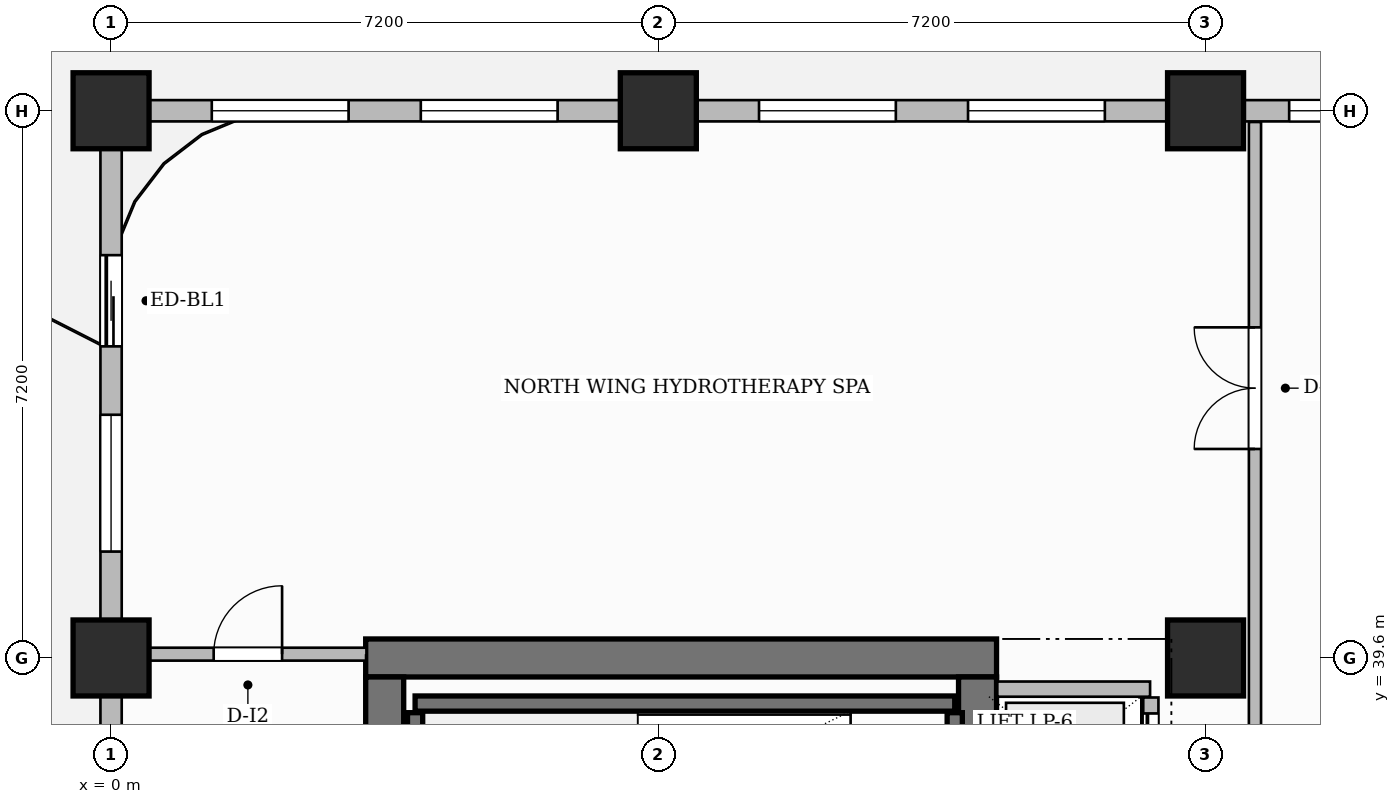
"""IFC4 building model, lengths in metres.
Left out: names, types, materials, properties, quantities, classifications, styles, units other than length and angle.
Written with IfcOpenShell. Run it as: python <this file> out.ifc"""

import sys

from ifc_helpers import new_model, si_unit, direction, frame, frame_2d, origin, origin_2d, place, context, subcontext, project, spatial, rectangle, extrude, source, transform, mapped, element, fill, save


model = new_model("IFC4")
c1 = context("Model", 3, precision=1e-05, world=origin(), true_north=direction((0.0, 1.0)))
c2 = subcontext(c1, "Body", "Model", "MODEL_VIEW")
j1 = project(units=[si_unit("LENGTHUNIT", "METRE"), si_unit("PLANEANGLEUNIT", "RADIAN")], contexts=[c1])
p1 = place(None, origin())
s1 = spatial("IfcSite", under=j1, at=p1, CompositionType="ELEMENT")
p2 = place(p1, origin())
s2 = spatial("IfcBuilding", under=s1, at=p2, CompositionType="ELEMENT")
p3 = place(p2, frame((0.0, 0.0, 181.1)))
s3 = spatial("IfcBuildingStorey", under=s2, at=p3, CompositionType="ELEMENT", Elevation=181.1)
p4 = place(p3, frame((3.35, 39.6, 0.0), z_axis=(0.0, 0.0, 1.0), x_axis=(1.0, 0.0, 0.0)))
e1 = element("IfcWall", 1, at=p4, inside=s3, PredefinedType="SHEAR", context=c2, shape_type="SweptSolid", body=[
    extrude(rectangle(XDim=8.3, YDim=0.5, at=frame_2d((4.15, 0.0))), origin(), (0.0, 0.0, 1.0), 3.85),
])
p5 = place(p3, frame((3.6, 25.45, 0.0), z_axis=(0.0, 0.0, 1.0), x_axis=(0.0, 1.0, 0.0)))
e2 = element("IfcWall", 2, at=p5, inside=s3, PredefinedType="SHEAR", context=c2, shape_type="SweptSolid", body=[
    extrude(rectangle(XDim=13.9, YDim=0.5, at=frame_2d((6.95, 0.0))), origin(), (0.0, 0.0, 1.0), 3.85),
])
p6 = place(p3, frame((11.4, 25.45, 0.0), z_axis=(0.0, 0.0, 1.0), x_axis=(0.0, 1.0, 0.0)))
e3 = element("IfcWall", 3, at=p6, inside=s3, PredefinedType="SHEAR", context=c2, shape_type="SweptSolid", body=[
    extrude(rectangle(XDim=13.9, YDim=0.5, at=frame_2d((6.95, 0.0))), origin(), (0.0, 0.0, 1.0), 3.85),
])
p7 = place(p6, frame((6.52, 0.0, 0.0)))
e4 = element("IfcOpeningElement", 4, at=p7, cuts=e3, PredefinedType="OPENING", context=c2, shape_type="SweptSolid", body=[
    extrude(rectangle(XDim=1.5, YDim=2.2, at=frame_2d((0.75, 1.1))), frame((0.0, 0.26, 0.0), z_axis=(0.0, -1.0, 0.0), x_axis=(1.0, 0.0, 0.0)), (0.0, 0.0, 1.0), 0.52),
])
m1 = source(origin(), c2, "Body", "SweptSolid", [
    extrude(rectangle(XDim=1.0, YDim=1.0, at=origin_2d()), origin(), (0.0, 0.0, 1.0), 3.85),
])
for number, where, z_axis, x_axis in (
    (5, (0.0, 39.6, 0.0), (0.0, 0.0, 1.0), (1.0, 0.0, 0.0)),
    (6, (0.0, 46.8, 0.0), (0.0, 0.0, 1.0), (1.0, 0.0, 0.0)),
    (7, (7.2, 46.8, 0.0), (0.0, 0.0, 1.0), (1.0, 0.0, 0.0)),
    (8, (14.4, 39.6, 0.0), (0.0, 0.0, 1.0), (1.0, 0.0, 0.0)),
    (9, (14.4, 46.8, 0.0), (0.0, 0.0, 1.0), (1.0, 0.0, 0.0)),
):
    element("IfcColumn", number, at=place(p3, frame(where, z_axis=z_axis, x_axis=x_axis)), inside=s3, PredefinedType="COLUMN", context=c2, shape_type="MappedRepresentation", body=[
        mapped(m1, transform((0.0, 0.0, 0.0), scale=1.0)),
    ])
p8 = place(p3, frame((4.0, 39.0, 0.0), z_axis=(0.0, 0.0, 1.0), x_axis=(1.0, 0.0, 0.0)))
e10 = element("IfcWall", 10, at=p8, inside=s3, PredefinedType="SHEAR", context=c2, shape_type="SweptSolid", body=[
    extrude(rectangle(XDim=7.1, YDim=0.2, at=frame_2d((3.55, 0.0))), origin(), (0.0, 0.0, 1.0), 3.85),
])
for number, where, z_axis, x_axis in (
    (11, (4.0, 36.18, 0.0), (0.0, 0.0, 1.0), (0.0, 1.0, 0.0)),
    (12, (11.1, 36.18, 0.0), (0.0, 0.0, 1.0), (0.0, 1.0, 0.0)),
):
    element("IfcWall", number, at=place(p3, frame(where, z_axis=z_axis, x_axis=x_axis)), inside=s3, PredefinedType="SHEAR", context=c2, shape_type="SweptSolid", body=[
        extrude(rectangle(XDim=2.7, YDim=0.2, at=frame_2d((1.35, 0.0))), origin(), (0.0, 0.0, 1.0), 3.85),
    ])
p9 = place(p3, frame((11.66, 39.19, 0.0), z_axis=(0.0, 0.0, 1.0), x_axis=(1.0, 0.0, 0.0)))
e13 = element("IfcWall", 13, at=p9, inside=s3, PredefinedType="PARTITIONING", context=c2, shape_type="SweptSolid", body=[
    extrude(rectangle(XDim=2.01, YDim=0.2, at=frame_2d((1.005, 0.0))), origin(), (0.0, 0.0, 1.0), 3.6),
])
p10 = place(p3, frame((13.68, 34.36, 0.0), z_axis=(0.0, 0.0, 1.0), x_axis=(0.0, 1.0, 0.0)))
e14 = element("IfcWall", 14, at=p10, inside=s3, PredefinedType="PARTITIONING", context=c2, shape_type="SweptSolid", body=[
    extrude(rectangle(XDim=4.72, YDim=0.2, at=frame_2d((2.36, 0.0))), origin(), (0.0, 0.0, 1.0), 3.6),
])
p11 = place(p10, frame((0.21, 0.0, 0.0)))
e15 = element("IfcOpeningElement", 15, at=p11, cuts=e14, PredefinedType="OPENING", context=c2, shape_type="SweptSolid", body=[
    extrude(rectangle(XDim=1.1, YDim=2.2, at=frame_2d((0.55, 1.1))), frame((0.0, 0.11, 0.0), z_axis=(0.0, -1.0, 0.0), x_axis=(1.0, 0.0, 0.0)), (0.0, 0.0, 1.0), 0.22),
])
p12 = place(p10, frame((1.81, 0.0, 0.0)))
e16 = element("IfcOpeningElement", 16, at=p12, cuts=e14, PredefinedType="OPENING", context=c2, shape_type="SweptSolid", body=[
    extrude(rectangle(XDim=1.1, YDim=2.2, at=frame_2d((0.55, 1.1))), frame((0.0, 0.11, 0.0), z_axis=(0.0, -1.0, 0.0), x_axis=(1.0, 0.0, 0.0)), (0.0, 0.0, 1.0), 0.22),
])
p13 = place(p10, frame((3.41, 0.0, 0.0)))
e17 = element("IfcOpeningElement", 17, at=p13, cuts=e14, PredefinedType="OPENING", context=c2, shape_type="SweptSolid", body=[
    extrude(rectangle(XDim=1.1, YDim=2.2, at=frame_2d((0.55, 1.1))), frame((0.0, 0.11, 0.0), z_axis=(0.0, -1.0, 0.0), x_axis=(1.0, 0.0, 0.0)), (0.0, 0.0, 1.0), 0.22),
])
p14 = place(p3, frame((0.24, 39.65, 0.0), z_axis=(0.0, 0.0, 1.0), x_axis=(1.0, 0.0, 0.0)))
e18 = element("IfcWall", 18, at=p14, inside=s3, PredefinedType="PARTITIONING", context=c2, shape_type="SweptSolid", body=[
    extrude(rectangle(XDim=3.12, YDim=0.17, at=frame_2d((1.56, 0.0))), origin(), (0.0, 0.0, 1.0), 3.6),
])
p15 = place(p14, frame((1.11, 0.0, 0.0)))
e19 = element("IfcOpeningElement", 19, at=p15, cuts=e18, PredefinedType="OPENING", context=c2, shape_type="SweptSolid", body=[
    extrude(rectangle(XDim=0.9, YDim=2.15, at=frame_2d((0.45, 1.075))), frame((0.0, 0.095, 0.0), z_axis=(0.0, -1.0, 0.0), x_axis=(1.0, 0.0, 0.0)), (0.0, 0.0, 1.0), 0.19),
])
p16 = place(p3, frame((15.05, 34.34, 0.0), z_axis=(0.0, 0.0, 1.0), x_axis=(0.0, 1.0, 0.0)))
e20 = element("IfcWall", 20, at=p16, inside=s3, PredefinedType="PARTITIONING", context=c2, shape_type="SweptSolid", body=[
    extrude(rectangle(XDim=12.312, YDim=0.16, at=frame_2d((6.156, 0.0))), origin(), (0.0, 0.0, 1.0), 3.6),
])
p17 = place(p16, frame((8.01, 0.0, 0.0)))
e21 = element("IfcOpeningElement", 21, at=p17, cuts=e20, PredefinedType="OPENING", context=c2, shape_type="SweptSolid", body=[
    extrude(rectangle(XDim=1.6, YDim=2.4, at=frame_2d((0.8, 1.2))), frame((0.0, 0.09, 0.0), z_axis=(0.0, -1.0, 0.0), x_axis=(1.0, 0.0, 0.0)), (0.0, 0.0, 1.0), 0.18),
])
p18 = place(p3, frame((0.0, 25.25, 0.0), z_axis=(0.0, 0.0, 1.0), x_axis=(0.0, 1.0, 0.0)))
e22 = element("IfcWall", 22, at=p18, inside=s3, PredefinedType="SOLIDWALL", context=c2, shape_type="SweptSolid", body=[
    extrude(rectangle(XDim=21.5, YDim=0.28, at=frame_2d((10.75, 0.0))), origin(), (0.0, 0.0, 1.0), 3.085),
])
p19 = place(p18, frame((18.45, 0.0, 0.0)))
e23 = element("IfcOpeningElement", 23, at=p19, cuts=e22, PredefinedType="OPENING", context=c2, shape_type="SweptSolid", body=[
    extrude(rectangle(XDim=1.2, YDim=2.2, at=frame_2d((0.6, 1.1))), frame((0.0, 0.15, 0.0), z_axis=(0.0, -1.0, 0.0), x_axis=(1.0, 0.0, 0.0)), (0.0, 0.0, 1.0), 0.3),
])
p20 = place(p18, frame((0.8, 0.0, 0.0)))
e24 = element("IfcOpeningElement", 24, at=p20, cuts=e22, PredefinedType="OPENING", context=c2, shape_type="SweptSolid", body=[
    extrude(rectangle(XDim=1.2, YDim=2.2, at=frame_2d((0.6, 1.1))), frame((0.0, 0.15, 0.0), z_axis=(0.0, -1.0, 0.0), x_axis=(1.0, 0.0, 0.0)), (0.0, 0.0, 1.0), 0.3),
])
p21 = place(p18, frame((3.425, 0.0, 0.8)))
e25 = element("IfcOpeningElement", 25, at=p21, cuts=e22, PredefinedType="OPENING", context=c2, shape_type="SweptSolid", body=[
    extrude(rectangle(XDim=1.8, YDim=1.85, at=frame_2d((0.9, 0.925))), frame((0.0, 0.15, 0.0), z_axis=(0.0, -1.0, 0.0), x_axis=(1.0, 0.0, 0.0)), (0.0, 0.0, 1.0), 0.3),
])
p22 = place(p18, frame((8.475, 0.0, 0.8)))
e26 = element("IfcOpeningElement", 26, at=p22, cuts=e22, PredefinedType="OPENING", context=c2, shape_type="SweptSolid", body=[
    extrude(rectangle(XDim=1.8, YDim=1.85, at=frame_2d((0.9, 0.925))), frame((0.0, 0.15, 0.0), z_axis=(0.0, -1.0, 0.0), x_axis=(1.0, 0.0, 0.0)), (0.0, 0.0, 1.0), 0.3),
])
p23 = place(p18, frame((11.225, 0.0, 0.8)))
e27 = element("IfcOpeningElement", 27, at=p23, cuts=e22, PredefinedType="OPENING", context=c2, shape_type="SweptSolid", body=[
    extrude(rectangle(XDim=1.8, YDim=1.85, at=frame_2d((0.9, 0.925))), frame((0.0, 0.15, 0.0), z_axis=(0.0, -1.0, 0.0), x_axis=(1.0, 0.0, 0.0)), (0.0, 0.0, 1.0), 0.3),
])
p24 = place(p18, frame((15.75, 0.0, 0.8)))
e28 = element("IfcOpeningElement", 28, at=p24, cuts=e22, PredefinedType="OPENING", context=c2, shape_type="SweptSolid", body=[
    extrude(rectangle(XDim=1.8, YDim=1.85, at=frame_2d((0.9, 0.925))), frame((0.0, 0.15, 0.0), z_axis=(0.0, -1.0, 0.0), x_axis=(1.0, 0.0, 0.0)), (0.0, 0.0, 1.0), 0.3),
])
p25 = place(p3, frame((0.0, 46.8, 0.0), z_axis=(0.0, 0.0, 1.0), x_axis=(1.0, 0.0, 0.0)))
e29 = element("IfcWall", 29, at=p25, inside=s3, PredefinedType="SOLIDWALL", context=c2, shape_type="SweptSolid", body=[
    extrude(rectangle(XDim=18.0, YDim=0.28, at=frame_2d((9.0, 0.0))), origin(), (0.0, 0.0, 1.0), 3.085),
])
p26 = place(p25, frame((1.325, 0.0, 0.8)))
e30 = element("IfcOpeningElement", 30, at=p26, cuts=e29, PredefinedType="OPENING", context=c2, shape_type="SweptSolid", body=[
    extrude(rectangle(XDim=1.8, YDim=1.85, at=frame_2d((0.9, 0.925))), frame((0.0, 0.15, 0.0), z_axis=(0.0, -1.0, 0.0), x_axis=(1.0, 0.0, 0.0)), (0.0, 0.0, 1.0), 0.3),
])
p27 = place(p25, frame((4.075, 0.0, 0.8)))
e31 = element("IfcOpeningElement", 31, at=p27, cuts=e29, PredefinedType="OPENING", context=c2, shape_type="SweptSolid", body=[
    extrude(rectangle(XDim=1.8, YDim=1.85, at=frame_2d((0.9, 0.925))), frame((0.0, 0.15, 0.0), z_axis=(0.0, -1.0, 0.0), x_axis=(1.0, 0.0, 0.0)), (0.0, 0.0, 1.0), 0.3),
])
p28 = place(p25, frame((8.525, 0.0, 0.8)))
e32 = element("IfcOpeningElement", 32, at=p28, cuts=e29, PredefinedType="OPENING", context=c2, shape_type="SweptSolid", body=[
    extrude(rectangle(XDim=1.8, YDim=1.85, at=frame_2d((0.9, 0.925))), frame((0.0, 0.15, 0.0), z_axis=(0.0, -1.0, 0.0), x_axis=(1.0, 0.0, 0.0)), (0.0, 0.0, 1.0), 0.3),
])
p29 = place(p25, frame((11.275, 0.0, 0.8)))
e33 = element("IfcOpeningElement", 33, at=p29, cuts=e29, PredefinedType="OPENING", context=c2, shape_type="SweptSolid", body=[
    extrude(rectangle(XDim=1.8, YDim=1.85, at=frame_2d((0.9, 0.925))), frame((0.0, 0.15, 0.0), z_axis=(0.0, -1.0, 0.0), x_axis=(1.0, 0.0, 0.0)), (0.0, 0.0, 1.0), 0.3),
])
p30 = place(p25, frame((15.5, 0.0, 0.8)))
e34 = element("IfcOpeningElement", 34, at=p30, cuts=e29, PredefinedType="OPENING", context=c2, shape_type="SweptSolid", body=[
    extrude(rectangle(XDim=1.4, YDim=1.85, at=frame_2d((0.7, 0.925))), frame((0.0, 0.15, 0.0), z_axis=(0.0, -1.0, 0.0), x_axis=(1.0, 0.0, 0.0)), (0.0, 0.0, 1.0), 0.3),
])
m2 = source(origin(), c2, "Body", "SweptSolid", [
    extrude(rectangle(XDim=0.9, YDim=2.15, at=frame_2d((0.45, 1.075))), frame((0.0, 0.025, 0.0), z_axis=(0.0, -1.0, 0.0), x_axis=(1.0, 0.0, 0.0)), (0.0, 0.0, 1.0), 0.05),
])
p31 = place(p15, origin())
e35 = element("IfcDoor", 35, at=p31, inside=s3, OperationType="SINGLE_SWING_RIGHT", PredefinedType="DOOR", context=c2, shape_type="MappedRepresentation", body=[
    mapped(m2, transform((0.0, 0.0, 0.0), scale=1.0)),
])
fill(e19, e35)
m3 = source(origin(), c2, "Body", "SweptSolid", [
    extrude(rectangle(XDim=1.6, YDim=2.4, at=frame_2d((0.8, 1.2))), frame((0.0, 0.025, 0.0), z_axis=(0.0, -1.0, 0.0), x_axis=(1.0, 0.0, 0.0)), (0.0, 0.0, 1.0), 0.05),
])
p32 = place(p17, origin())
e36 = element("IfcDoor", 36, at=p32, inside=s3, OperationType="DOUBLE_DOOR_SINGLE_SWING", PredefinedType="DOOR", context=c2, shape_type="MappedRepresentation", body=[
    mapped(m3, transform((0.0, 0.0, 0.0), scale=1.0)),
])
fill(e21, e36)
m4 = source(origin(), c2, "Body", "SweptSolid", [
    extrude(rectangle(XDim=1.1, YDim=2.2, at=frame_2d((0.55, 1.1))), frame((0.0, 0.025, 0.0), z_axis=(0.0, -1.0, 0.0), x_axis=(1.0, 0.0, 0.0)), (0.0, 0.0, 1.0), 0.05),
])
p33 = place(p13, origin())
e37 = element("IfcDoor", 37, at=p33, inside=s3, OperationType="SLIDING_TO_LEFT", PredefinedType="DOOR", context=c2, shape_type="MappedRepresentation", body=[
    mapped(m4, transform((0.0, 0.0, 0.0), scale=1.0)),
])
fill(e17, e37)
m5 = source(origin(), c2, "Body", "SweptSolid", [
    extrude(rectangle(XDim=1.2, YDim=2.2, at=frame_2d((0.6, 1.1))), frame((0.0, 0.025, 0.0), z_axis=(0.0, -1.0, 0.0), x_axis=(1.0, 0.0, 0.0)), (0.0, 0.0, 1.0), 0.05),
])
p34 = place(p19, origin())
e38 = element("IfcDoor", 38, at=p34, inside=s3, OperationType="SLIDING_TO_LEFT", PredefinedType="DOOR", context=c2, shape_type="MappedRepresentation", body=[
    mapped(m5, transform((0.0, 0.0, 0.0), scale=1.0)),
])
fill(e23, e38)
m6 = source(origin(), c2, "Body", "SweptSolid", [
    extrude(rectangle(XDim=1.8, YDim=1.85, at=frame_2d((0.9, 0.925))), frame((0.0, 0.03, 0.0), z_axis=(0.0, -1.0, 0.0), x_axis=(1.0, 0.0, 0.0)), (0.0, 0.0, 1.0), 0.06),
])
p35 = place(p24, origin())
e39 = element("IfcWindow", 39, at=p35, inside=s3, PartitioningType="DOUBLE_PANEL_VERTICAL", PredefinedType="WINDOW", context=c2, shape_type="MappedRepresentation", body=[
    mapped(m6, transform((0.0, 0.0, 0.0), scale=1.0)),
])
fill(e28, e39)
p36 = place(p26, origin())
e40 = element("IfcWindow", 40, at=p36, inside=s3, PartitioningType="DOUBLE_PANEL_VERTICAL", PredefinedType="WINDOW", context=c2, shape_type="MappedRepresentation", body=[
    mapped(m6, transform((0.0, 0.0, 0.0), scale=1.0)),
])
fill(e30, e40)
p37 = place(p27, origin())
e41 = element("IfcWindow", 41, at=p37, inside=s3, PartitioningType="DOUBLE_PANEL_VERTICAL", PredefinedType="WINDOW", context=c2, shape_type="MappedRepresentation", body=[
    mapped(m6, transform((0.0, 0.0, 0.0), scale=1.0)),
])
fill(e31, e41)
p38 = place(p28, origin())
e42 = element("IfcWindow", 42, at=p38, inside=s3, PartitioningType="DOUBLE_PANEL_VERTICAL", PredefinedType="WINDOW", context=c2, shape_type="MappedRepresentation", body=[
    mapped(m6, transform((0.0, 0.0, 0.0), scale=1.0)),
])
fill(e32, e42)
p39 = place(p29, origin())
e43 = element("IfcWindow", 43, at=p39, inside=s3, PartitioningType="DOUBLE_PANEL_VERTICAL", PredefinedType="WINDOW", context=c2, shape_type="MappedRepresentation", body=[
    mapped(m6, transform((0.0, 0.0, 0.0), scale=1.0)),
])
fill(e33, e43)
m7 = source(origin(), c2, "Body", "SweptSolid", [
    extrude(rectangle(XDim=1.4, YDim=1.85, at=frame_2d((0.7, 0.925))), frame((0.0, 0.03, 0.0), z_axis=(0.0, -1.0, 0.0), x_axis=(1.0, 0.0, 0.0)), (0.0, 0.0, 1.0), 0.06),
])
p40 = place(p30, origin())
e44 = element("IfcWindow", 44, at=p40, inside=s3, PartitioningType="SINGLE_PANEL", PredefinedType="WINDOW", context=c2, shape_type="MappedRepresentation", body=[
    mapped(m7, transform((0.0, 0.0, 0.0), scale=1.0)),
])
fill(e34, e44)
save(model, sys.argv[1])
